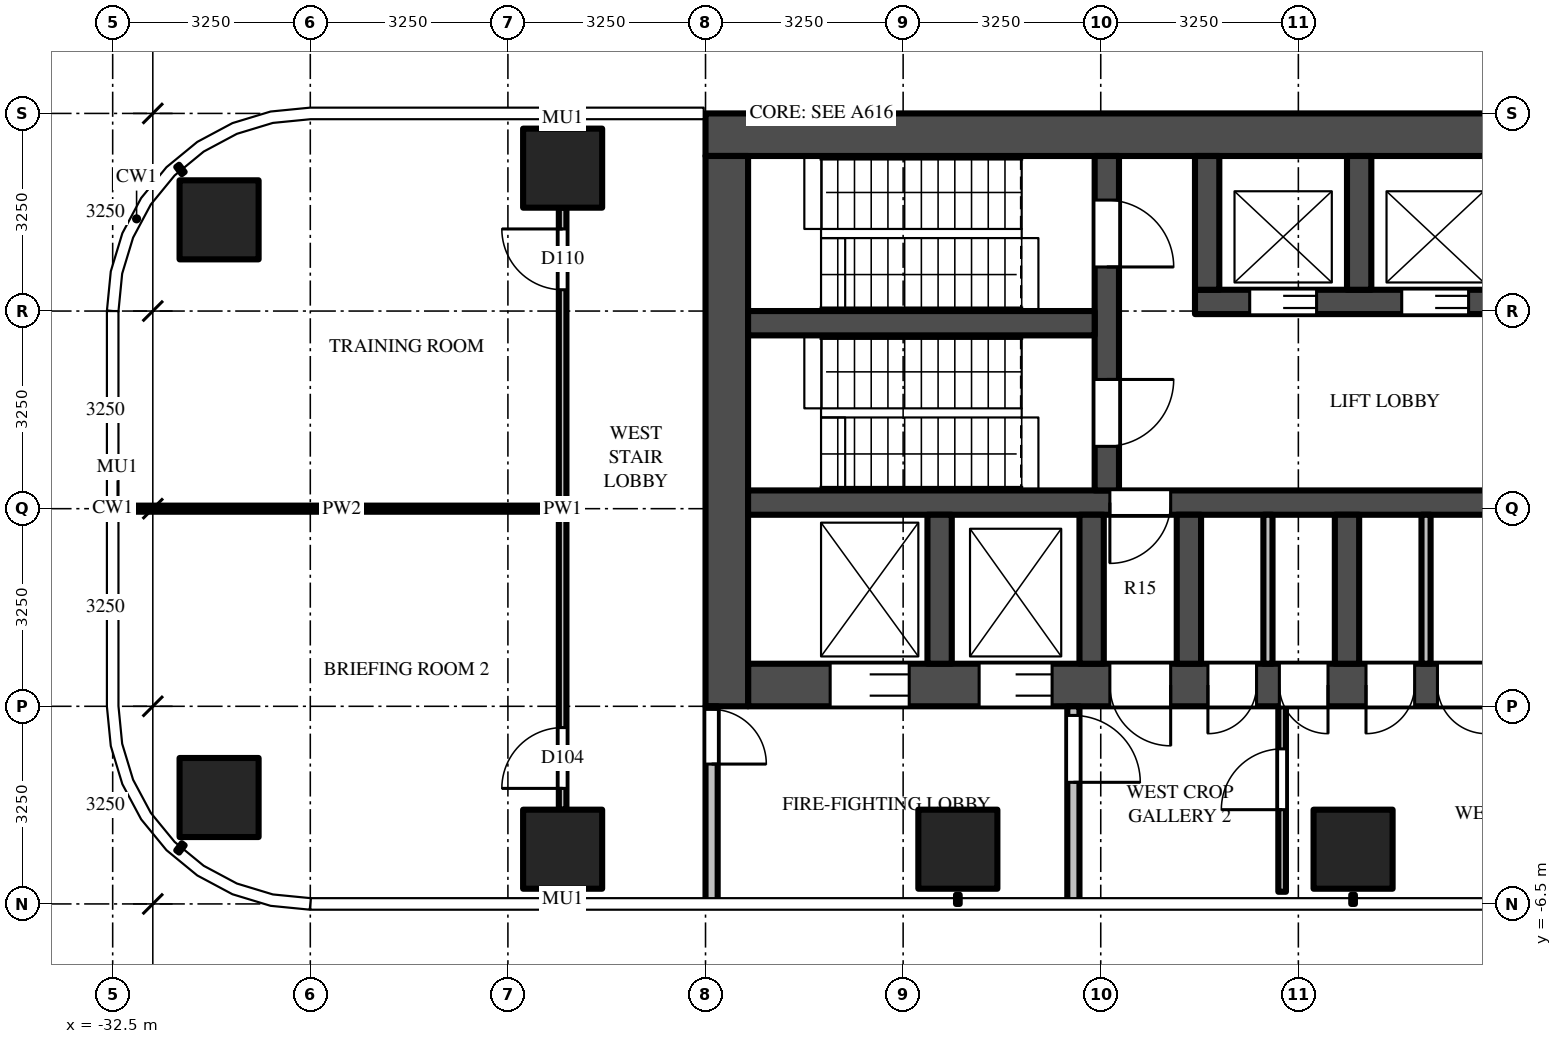
"""IFC4 building model, lengths in metres.
Left out: names, types, materials, properties, quantities, classifications, styles, units other than length and angle.
Written with IfcOpenShell. Run it as: python <this file> out.ifc"""

import sys

from ifc_helpers import new_model, si_unit, direction, frame, frame_2d, origin, origin_2d, place, context, subcontext, project, spatial, rectangle, extrude, source, transform, mapped, element, fill, save


model = new_model("IFC4")
c1 = context("Model", 3, precision=1e-05, world=origin(), true_north=direction((0.0, 1.0)))
c2 = subcontext(c1, "Body", "Model", "MODEL_VIEW")
j1 = project(units=[si_unit("LENGTHUNIT", "METRE"), si_unit("PLANEANGLEUNIT", "RADIAN")], contexts=[c1])
p1 = place(None, origin())
s1 = spatial("IfcSite", under=j1, at=p1, CompositionType="ELEMENT")
p2 = place(p1, origin())
s2 = spatial("IfcBuilding", under=s1, at=p2, CompositionType="ELEMENT")
p3 = place(p2, frame((0.0, 0.0, 138.0)))
s3 = spatial("IfcBuildingStorey", under=s2, at=p3, CompositionType="ELEMENT", Elevation=138.0)
m1 = source(origin(), c2, "Body", "SweptSolid", [
    extrude(rectangle(XDim=1.3, YDim=1.3, at=origin_2d()), origin(), (0.0, 0.0, 1.0), 4.5),
])
for number, where, z_axis, x_axis in (
    (1, (-12.1, -5.6, 0.0), (0.0, 0.0, 1.0), (1.0, 0.0, 0.0)),
    (2, (-18.6, -5.6, 0.0), (0.0, 0.0, 1.0), (1.0, 0.0, 0.0)),
    (3, (-25.1, -5.6, 0.0), (0.0, 0.0, 1.0), (1.0, 0.0, 0.0)),
    (4, (-30.75, -4.75, 0.0), (0.0, 0.0, 1.0), (1.0, 0.0, 0.0)),
    (5, (-25.1, 5.6, 0.0), (0.0, 0.0, 1.0), (1.0, 0.0, 0.0)),
    (6, (-30.75, 4.75, 0.0), (0.0, 0.0, 1.0), (1.0, 0.0, 0.0)),
):
    element("IfcColumn", number, at=place(p3, frame(where, z_axis=z_axis, x_axis=x_axis)), inside=s3, PredefinedType="COLUMN", context=c2, shape_type="MappedRepresentation", body=[
        mapped(m1, transform((0.0, 0.0, 0.0))),
    ])
m2 = source(origin(), c2, "Body", "SweptSolid", [
    extrude(rectangle(XDim=16.5, YDim=0.7, at=frame_2d((8.25, 0.0))), origin(), (0.0, 0.0, 1.0), 4.25),
])
p4 = place(p3, frame((-6.25, 6.15, 0.0), z_axis=(0.0, 0.0, 1.0), x_axis=(-1.0, 0.0, 0.0)))
e7 = element("IfcWall", 7, at=p4, inside=s3, PredefinedType="SHEAR", context=c2, shape_type="MappedRepresentation", body=[
    mapped(m2, transform((0.0, 0.0, 0.0))),
])
m3 = source(origin(), c2, "Body", "SweptSolid", [
    extrude(rectangle(XDim=14.85, YDim=0.7, at=frame_2d((7.425, 0.0))), origin(), (0.0, 0.0, 1.0), 4.25),
])
p5 = place(p3, frame((-7.2, -2.9, 0.0), z_axis=(0.0, 0.0, 1.0), x_axis=(-1.0, 0.0, 0.0)))
e8 = element("IfcWall", 8, at=p5, inside=s3, PredefinedType="SHEAR", context=c2, shape_type="MappedRepresentation", body=[
    mapped(m3, transform((0.0, 0.0, 0.0))),
])
m4 = source(origin(), c2, "Body", "SweptSolid", [
    extrude(rectangle(XDim=1.3, YDim=2.1, at=frame_2d((0.65, 1.05))), frame((0.0, 0.36, 0.0), z_axis=(0.0, -1.0, 0.0), x_axis=(1.0, 0.0, 0.0)), (0.0, 0.0, 1.0), 0.72),
])
p6 = place(p5, frame((12.2, 0.0, 0.0)))
e9 = element("IfcOpeningElement", 9, at=p6, cuts=e8, PredefinedType="OPENING", context=c2, shape_type="MappedRepresentation", body=[
    mapped(m4, transform((0.0, 0.0, 0.0))),
])
m5 = source(origin(), c2, "Body", "SweptSolid", [
    extrude(rectangle(XDim=1.2, YDim=2.1, at=frame_2d((0.6, 1.05))), frame((0.0, 0.36, 0.0), z_axis=(0.0, -1.0, 0.0), x_axis=(1.0, 0.0, 0.0)), (0.0, 0.0, 1.0), 0.72),
])
p7 = place(p5, frame((9.85, 0.0, 0.0)))
e10 = element("IfcOpeningElement", 10, at=p7, cuts=e8, PredefinedType="OPENING", context=c2, shape_type="MappedRepresentation", body=[
    mapped(m5, transform((0.0, 0.0, 0.0))),
])
m6 = source(origin(), c2, "Body", "SweptSolid", [
    extrude(rectangle(XDim=1.0, YDim=2.1, at=frame_2d((0.5, 1.05))), frame((0.0, 0.36, 0.0), z_axis=(0.0, -1.0, 0.0), x_axis=(1.0, 0.0, 0.0)), (0.0, 0.0, 1.0), 0.72),
])
p8 = place(p5, frame((7.9, 0.0, 0.0)))
e11 = element("IfcOpeningElement", 11, at=p8, cuts=e8, PredefinedType="OPENING", context=c2, shape_type="MappedRepresentation", body=[
    mapped(m6, transform((0.0, 0.0, 0.0))),
])
m7 = source(origin(), c2, "Body", "SweptSolid", [
    extrude(rectangle(XDim=0.8, YDim=2.1, at=frame_2d((0.4, 1.05))), frame((0.0, 0.36, 0.0), z_axis=(0.0, -1.0, 0.0), x_axis=(1.0, 0.0, 0.0)), (0.0, 0.0, 1.0), 0.72),
])
p9 = place(p5, frame((0.113, 0.0, 0.0)))
e12 = element("IfcOpeningElement", 12, at=p9, cuts=e8, PredefinedType="OPENING", context=c2, shape_type="MappedRepresentation", body=[
    mapped(m7, transform((0.0, 0.0, 0.0))),
])
p10 = place(p5, frame((1.288, 0.0, 0.0)))
e13 = element("IfcOpeningElement", 13, at=p10, cuts=e8, PredefinedType="OPENING", context=c2, shape_type="MappedRepresentation", body=[
    mapped(m7, transform((0.0, 0.0, 0.0))),
])
p11 = place(p5, frame((2.712, 0.0, 0.0)))
e14 = element("IfcOpeningElement", 14, at=p11, cuts=e8, PredefinedType="OPENING", context=c2, shape_type="MappedRepresentation", body=[
    mapped(m7, transform((0.0, 0.0, 0.0))),
])
p12 = place(p5, frame((3.887, 0.0, 0.0)))
e15 = element("IfcOpeningElement", 15, at=p12, cuts=e8, PredefinedType="OPENING", context=c2, shape_type="MappedRepresentation", body=[
    mapped(m7, transform((0.0, 0.0, 0.0))),
])
p13 = place(p5, frame((5.312, 0.0, 0.0)))
e16 = element("IfcOpeningElement", 16, at=p13, cuts=e8, PredefinedType="OPENING", context=c2, shape_type="MappedRepresentation", body=[
    mapped(m7, transform((0.0, 0.0, 0.0))),
])
p14 = place(p5, frame((6.488, 0.0, 0.0)))
e17 = element("IfcOpeningElement", 17, at=p14, cuts=e8, PredefinedType="OPENING", context=c2, shape_type="MappedRepresentation", body=[
    mapped(m7, transform((0.0, 0.0, 0.0))),
])
m8 = source(origin(), c2, "Body", "SweptSolid", [
    extrude(rectangle(XDim=9.05, YDim=0.7, at=frame_2d((4.525, 0.0))), origin(), (0.0, 0.0, 1.0), 4.25),
])
p15 = place(p3, frame((-22.4, 5.8, 0.0), z_axis=(0.0, 0.0, 1.0), x_axis=(0.0, -1.0, 0.0)))
e18 = element("IfcWall", 18, at=p15, inside=s3, PredefinedType="SHEAR", context=c2, shape_type="MappedRepresentation", body=[
    mapped(m8, transform((0.0, 0.0, 0.0))),
])
m9 = source(origin(), c2, "Body", "SweptSolid", [
    extrude(rectangle(XDim=7.5, YDim=0.4, at=frame_2d((3.75, 0.0))), origin(), (0.0, 0.0, 1.0), 4.25),
])
p16 = place(p3, frame((-7.2, 3.4, 0.0), z_axis=(0.0, 0.0, 1.0), x_axis=(-1.0, 0.0, 0.0)))
e19 = element("IfcWall", 19, at=p16, inside=s3, PredefinedType="SHEAR", context=c2, shape_type="MappedRepresentation", body=[
    mapped(m9, transform((0.0, 0.0, 0.0))),
])
m10 = source(origin(), c2, "Body", "SweptSolid", [
    extrude(rectangle(XDim=1.1, YDim=2.1, at=frame_2d((0.55, 1.05))), frame((0.0, 0.21, 0.0), z_axis=(0.0, -1.0, 0.0), x_axis=(1.0, 0.0, 0.0)), (0.0, 0.0, 1.0), 0.42),
])
p17 = place(p16, frame((3.0, 0.0, 0.0)))
e20 = element("IfcOpeningElement", 20, at=p17, cuts=e19, PredefinedType="OPENING", context=c2, shape_type="MappedRepresentation", body=[
    mapped(m10, transform((0.0, 0.0, 0.0))),
])
p18 = place(p16, frame((5.5, 0.0, 0.0)))
e21 = element("IfcOpeningElement", 21, at=p18, cuts=e19, PredefinedType="OPENING", context=c2, shape_type="MappedRepresentation", body=[
    mapped(m10, transform((0.0, 0.0, 0.0))),
])
m11 = source(origin(), c2, "Body", "SweptSolid", [
    extrude(rectangle(XDim=14.85, YDim=0.4, at=frame_2d((7.425, 0.0))), origin(), (0.0, 0.0, 1.0), 4.25),
])
p19 = place(p3, frame((-7.2, 0.1, 0.0), z_axis=(0.0, 0.0, 1.0), x_axis=(-1.0, 0.0, 0.0)))
e22 = element("IfcWall", 22, at=p19, inside=s3, PredefinedType="SHEAR", context=c2, shape_type="MappedRepresentation", body=[
    mapped(m11, transform((0.0, 0.0, 0.0))),
])
m12 = source(origin(), c2, "Body", "SweptSolid", [
    extrude(rectangle(XDim=1.0, YDim=2.1, at=frame_2d((0.5, 1.05))), frame((0.0, 0.21, 0.0), z_axis=(0.0, -1.0, 0.0), x_axis=(1.0, 0.0, 0.0)), (0.0, 0.0, 1.0), 0.42),
])
p20 = place(p19, frame((7.9, 0.0, 0.0)))
e23 = element("IfcOpeningElement", 23, at=p20, cuts=e22, PredefinedType="OPENING", context=c2, shape_type="MappedRepresentation", body=[
    mapped(m12, transform((0.0, 0.0, 0.0))),
])
m13 = source(origin(), c2, "Body", "SweptSolid", [
    extrude(rectangle(XDim=5.5, YDim=0.4, at=frame_2d((2.75, 0.0))), origin(), (0.0, 0.0, 1.0), 4.25),
])
p21 = place(p3, frame((-16.15, 5.8, 0.0), z_axis=(0.0, 0.0, 1.0), x_axis=(0.0, -1.0, 0.0)))
e24 = element("IfcWall", 24, at=p21, inside=s3, PredefinedType="SHEAR", context=c2, shape_type="MappedRepresentation", body=[
    mapped(m13, transform((0.0, 0.0, 0.0))),
])
p22 = place(p21, frame((0.725, 0.0, 0.0)))
e25 = element("IfcOpeningElement", 25, at=p22, cuts=e24, PredefinedType="OPENING", context=c2, shape_type="MappedRepresentation", body=[
    mapped(m10, transform((0.0, 0.0, 0.0))),
])
p23 = place(p21, frame((3.675, 0.0, 0.0)))
e26 = element("IfcOpeningElement", 26, at=p23, cuts=e24, PredefinedType="OPENING", context=c2, shape_type="MappedRepresentation", body=[
    mapped(m10, transform((0.0, 0.0, 0.0))),
])
m14 = source(origin(), c2, "Body", "SweptSolid", [
    extrude(rectangle(XDim=5.7, YDim=0.4, at=frame_2d((2.85, 0.0))), origin(), (0.0, 0.0, 1.0), 4.25),
])
p24 = place(p3, frame((-16.35, 3.05, 0.0), z_axis=(0.0, 0.0, 1.0), x_axis=(-1.0, 0.0, 0.0)))
e27 = element("IfcWall", 27, at=p24, inside=s3, PredefinedType="SHEAR", context=c2, shape_type="MappedRepresentation", body=[
    mapped(m14, transform((0.0, 0.0, 0.0))),
])
m15 = source(origin(), c2, "Body", "SweptSolid", [
    extrude(rectangle(XDim=2.2, YDim=0.4, at=frame_2d((1.1, 0.0))), origin(), (0.0, 0.0, 1.0), 4.25),
])
for number, where, z_axis, x_axis in (
    (28, (-12.0, 5.8, 0.0), (0.0, 0.0, 1.0), (0.0, -1.0, 0.0)),
    (29, (-14.5, 5.8, 0.0), (0.0, 0.0, 1.0), (0.0, -1.0, 0.0)),
):
    element("IfcWall", number, at=place(p3, frame(where, z_axis=z_axis, x_axis=x_axis)), inside=s3, PredefinedType="SHEAR", context=c2, shape_type="MappedRepresentation", body=[
        mapped(m15, transform((0.0, 0.0, 0.0))),
    ])
m16 = source(origin(), c2, "Body", "SweptSolid", [
    extrude(rectangle(XDim=2.45, YDim=0.4, at=frame_2d((1.225, 0.0))), origin(), (0.0, 0.0, 1.0), 4.25),
])
for number, where, z_axis, x_axis in (
    (30, (-12.2, -0.1, 0.0), (0.0, 0.0, 1.0), (0.0, -1.0, 0.0)),
    (31, (-14.8, -0.1, 0.0), (0.0, 0.0, 1.0), (0.0, -1.0, 0.0)),
    (32, (-16.4, -0.1, 0.0), (0.0, 0.0, 1.0), (0.0, -1.0, 0.0)),
    (33, (-18.9, -0.1, 0.0), (0.0, 0.0, 1.0), (0.0, -1.0, 0.0)),
):
    element("IfcWall", number, at=place(p3, frame(where, z_axis=z_axis, x_axis=x_axis)), inside=s3, PredefinedType="SHEAR", context=c2, shape_type="MappedRepresentation", body=[
        mapped(m16, transform((0.0, 0.0, 0.0))),
    ])
m17 = source(origin(), c2, "Body", "SweptSolid", [
    extrude(rectangle(XDim=3.25, YDim=0.2, at=frame_2d((1.625, 0.0))), origin(), (0.0, 0.0, 1.0), 4.25),
])
p25 = place(p3, frame((-16.7, -3.25, 0.0), z_axis=(0.0, 0.0, 1.0), x_axis=(0.0, -1.0, 0.0)))
e34 = element("IfcWall", 34, at=p25, inside=s3, PredefinedType="PARTITIONING", context=c2, shape_type="MappedRepresentation", body=[
    mapped(m17, transform((0.0, 0.0, 0.0))),
])
m18 = source(origin(), c2, "Body", "SweptSolid", [
    extrude(rectangle(XDim=1.1, YDim=2.1, at=frame_2d((0.55, 1.05))), frame((0.0, 0.11, 0.0), z_axis=(0.0, -1.0, 0.0), x_axis=(1.0, 0.0, 0.0)), (0.0, 0.0, 1.0), 0.22),
])
p26 = place(p25, frame((0.15, 0.0, 0.0)))
e35 = element("IfcOpeningElement", 35, at=p26, cuts=e34, PredefinedType="OPENING", context=c2, shape_type="MappedRepresentation", body=[
    mapped(m18, transform((0.0, 0.0, 0.0))),
])
p27 = place(p3, frame((-22.65, -3.25, 0.0), z_axis=(0.0, 0.0, 1.0), x_axis=(0.0, -1.0, 0.0)))
e36 = element("IfcWall", 36, at=p27, inside=s3, PredefinedType="PARTITIONING", context=c2, shape_type="MappedRepresentation", body=[
    mapped(m17, transform((0.0, 0.0, 0.0))),
])
m19 = source(origin(), c2, "Body", "SweptSolid", [
    extrude(rectangle(XDim=0.9, YDim=2.1, at=frame_2d((0.45, 1.05))), frame((0.0, 0.11, 0.0), z_axis=(0.0, -1.0, 0.0), x_axis=(1.0, 0.0, 0.0)), (0.0, 0.0, 1.0), 0.22),
])
p28 = place(p27, frame((0.05, 0.0, 0.0)))
e37 = element("IfcOpeningElement", 37, at=p28, cuts=e36, PredefinedType="OPENING", context=c2, shape_type="MappedRepresentation", body=[
    mapped(m19, transform((0.0, 0.0, 0.0))),
])
m20 = source(origin(), c2, "Body", "SweptSolid", [
    extrude(rectangle(XDim=2.45, YDim=0.15, at=frame_2d((1.225, 0.0))), origin(), (0.0, 0.0, 1.0), 4.25),
])
for number, where, z_axis, x_axis in (
    (38, (-10.9, -0.1, 0.0), (0.0, 0.0, 1.0), (0.0, -1.0, 0.0)),
    (39, (-13.5, -0.1, 0.0), (0.0, 0.0, 1.0), (0.0, -1.0, 0.0)),
):
    element("IfcWall", number, at=place(p3, frame(where, z_axis=z_axis, x_axis=x_axis)), inside=s3, PredefinedType="PARTITIONING", context=c2, shape_type="MappedRepresentation", body=[
        mapped(m20, transform((0.0, 0.0, 0.0))),
    ])
m21 = source(origin(), c2, "Body", "SweptSolid", [
    extrude(rectangle(XDim=9.9, YDim=0.125, at=frame_2d((4.95, 0.0))), origin(), (0.0, 0.0, 1.0), 3.468),
])
p29 = place(p3, frame((-25.1, -4.95, 0.0), z_axis=(0.0, 0.0, 1.0), x_axis=(0.0, 1.0, 0.0)))
e40 = element("IfcWall", 40, at=p29, inside=s3, PredefinedType="PARTITIONING", context=c2, shape_type="MappedRepresentation", body=[
    mapped(m21, transform((0.0, 0.0, 0.0))),
])
m22 = source(origin(), c2, "Body", "SweptSolid", [
    extrude(rectangle(XDim=1.0, YDim=2.1, at=frame_2d((0.5, 1.05))), frame((0.0, 0.073, 0.0), z_axis=(0.0, -1.0, 0.0), x_axis=(1.0, 0.0, 0.0)), (0.0, 0.0, 1.0), 0.145),
])
p30 = place(p29, frame((0.35, 0.0, 0.0)))
e41 = element("IfcOpeningElement", 41, at=p30, cuts=e40, PredefinedType="OPENING", context=c2, shape_type="MappedRepresentation", body=[
    mapped(m22, transform((0.0, 0.0, 0.0))),
])
p31 = place(p29, frame((8.55, 0.0, 0.0)))
e42 = element("IfcOpeningElement", 42, at=p31, cuts=e40, PredefinedType="OPENING", context=c2, shape_type="MappedRepresentation", body=[
    mapped(m22, transform((0.0, 0.0, 0.0))),
])
m23 = source(origin(), c2, "Body", "SweptSolid", [
    extrude(rectangle(XDim=3.05, YDim=0.125, at=frame_2d((1.525, 0.0))), origin(), (0.0, 0.0, 1.0), 3.33),
])
p32 = place(p3, frame((-13.267, -6.3, 0.0), z_axis=(0.0, 0.0, 1.0), x_axis=(0.0, 1.0, 0.0)))
e43 = element("IfcWall", 43, at=p32, inside=s3, PredefinedType="PARTITIONING", context=c2, shape_type="MappedRepresentation", body=[
    mapped(m23, transform((0.0, 0.0, 0.0))),
])
p33 = place(p32, frame((1.35, 0.0, 0.0)))
e44 = element("IfcOpeningElement", 44, at=p33, cuts=e43, PredefinedType="OPENING", context=c2, shape_type="MappedRepresentation", body=[
    mapped(m22, transform((0.0, 0.0, 0.0))),
])
m24 = source(origin(), c2, "Body", "SweptSolid", [
    extrude(rectangle(XDim=7.137, YDim=0.1, at=frame_2d((3.569, 0.0))), origin(), (0.0, 0.0, 1.0), 3.33),
])
p34 = place(p3, frame((-32.3, 0.0, 0.0), z_axis=(0.0, 0.0, 1.0), x_axis=(1.0, 0.0, 0.0)))
e45 = element("IfcWall", 45, at=p34, inside=s3, PredefinedType="PARTITIONING", context=c2, shape_type="MappedRepresentation", body=[
    mapped(m24, transform((0.0, 0.0, 0.0))),
])
m25 = source(origin(), c2, "Body", "SweptSolid", [
    extrude(rectangle(XDim=1.1, YDim=2.1, at=frame_2d((0.55, 1.05))), frame((0.0, 0.025, 0.0), z_axis=(0.0, -1.0, 0.0), x_axis=(1.0, 0.0, 0.0)), (0.0, 0.0, 1.0), 0.05),
])
p35 = place(p17, origin())
e46 = element("IfcDoor", 46, at=p35, inside=s3, OperationType="DOUBLE_DOOR_SLIDING", PredefinedType="DOOR", context=c2, shape_type="MappedRepresentation", body=[
    mapped(m25, transform((0.0, 0.0, 0.0))),
])
fill(e20, e46)
p36 = place(p18, origin())
e47 = element("IfcDoor", 47, at=p36, inside=s3, OperationType="DOUBLE_DOOR_SLIDING", PredefinedType="DOOR", context=c2, shape_type="MappedRepresentation", body=[
    mapped(m25, transform((0.0, 0.0, 0.0))),
])
fill(e21, e47)
m26 = source(origin(), c2, "Body", "SweptSolid", [
    extrude(rectangle(XDim=1.3, YDim=2.1, at=frame_2d((0.65, 1.05))), frame((0.0, -0.275, 0.0), z_axis=(0.0, -1.0, 0.0), x_axis=(1.0, 0.0, 0.0)), (0.0, 0.0, 1.0), 0.05),
])
p37 = place(p6, origin())
e48 = element("IfcDoor", 48, at=p37, inside=s3, OperationType="DOUBLE_DOOR_SLIDING", PredefinedType="DOOR", context=c2, shape_type="MappedRepresentation", body=[
    mapped(m26, transform((0.0, 0.0, 0.0))),
])
fill(e9, e48)
m27 = source(origin(), c2, "Body", "SweptSolid", [
    extrude(rectangle(XDim=1.2, YDim=2.1, at=frame_2d((0.6, 1.05))), frame((0.0, -0.275, 0.0), z_axis=(0.0, -1.0, 0.0), x_axis=(1.0, 0.0, 0.0)), (0.0, 0.0, 1.0), 0.05),
])
p38 = place(p7, origin())
e49 = element("IfcDoor", 49, at=p38, inside=s3, OperationType="DOUBLE_DOOR_SLIDING", PredefinedType="DOOR", context=c2, shape_type="MappedRepresentation", body=[
    mapped(m27, transform((0.0, 0.0, 0.0))),
])
fill(e10, e49)
p39 = place(p22, origin())
e50 = element("IfcDoor", 50, at=p39, inside=s3, OperationType="SINGLE_SWING_RIGHT", PredefinedType="DOOR", context=c2, shape_type="MappedRepresentation", body=[
    mapped(m25, transform((0.0, 0.0, 0.0))),
])
fill(e25, e50)
p40 = place(p23, origin())
e51 = element("IfcDoor", 51, at=p40, inside=s3, OperationType="SINGLE_SWING_LEFT", PredefinedType="DOOR", context=c2, shape_type="MappedRepresentation", body=[
    mapped(m25, transform((0.0, 0.0, 0.0))),
])
fill(e26, e51)
m28 = source(origin(), c2, "Body", "SweptSolid", [
    extrude(rectangle(XDim=1.0, YDim=2.1, at=frame_2d((0.5, 1.05))), frame((0.0, 0.025, 0.0), z_axis=(0.0, -1.0, 0.0), x_axis=(1.0, 0.0, 0.0)), (0.0, 0.0, 1.0), 0.05),
])
p41 = place(p20, origin())
e52 = element("IfcDoor", 52, at=p41, inside=s3, OperationType="SINGLE_SWING_RIGHT", PredefinedType="DOOR", context=c2, shape_type="MappedRepresentation", body=[
    mapped(m28, transform((0.0, 0.0, 0.0))),
])
fill(e23, e52)
m29 = source(origin(), c2, "Body", "SweptSolid", [
    extrude(rectangle(XDim=1.0, YDim=2.1, at=frame_2d((0.5, 1.05))), frame((0.0, -0.275, 0.0), z_axis=(0.0, -1.0, 0.0), x_axis=(1.0, 0.0, 0.0)), (0.0, 0.0, 1.0), 0.05),
])
p42 = place(p8, origin())
e53 = element("IfcDoor", 53, at=p42, inside=s3, OperationType="SINGLE_SWING_LEFT", PredefinedType="DOOR", context=c2, shape_type="MappedRepresentation", body=[
    mapped(m29, transform((0.0, 0.0, 0.0))),
])
fill(e11, e53)
p43 = place(p26, origin())
e54 = element("IfcDoor", 54, at=p43, inside=s3, OperationType="SINGLE_SWING_RIGHT", PredefinedType="DOOR", context=c2, shape_type="MappedRepresentation", body=[
    mapped(m25, transform((0.0, 0.0, 0.0))),
])
fill(e35, e54)
m30 = source(origin(), c2, "Body", "SweptSolid", [
    extrude(rectangle(XDim=0.9, YDim=2.1, at=frame_2d((0.45, 1.05))), frame((0.0, 0.025, 0.0), z_axis=(0.0, -1.0, 0.0), x_axis=(1.0, 0.0, 0.0)), (0.0, 0.0, 1.0), 0.05),
])
p44 = place(p28, origin())
e55 = element("IfcDoor", 55, at=p44, inside=s3, OperationType="SINGLE_SWING_RIGHT", PredefinedType="DOOR", context=c2, shape_type="MappedRepresentation", body=[
    mapped(m30, transform((0.0, 0.0, 0.0))),
])
fill(e37, e55)
m31 = source(origin(), c2, "Body", "SweptSolid", [
    extrude(rectangle(XDim=0.8, YDim=2.1, at=frame_2d((0.4, 1.05))), frame((0.0, -0.275, 0.0), z_axis=(0.0, -1.0, 0.0), x_axis=(1.0, 0.0, 0.0)), (0.0, 0.0, 1.0), 0.05),
])
p45 = place(p11, origin())
e56 = element("IfcDoor", 56, at=p45, inside=s3, OperationType="SINGLE_SWING_LEFT", PredefinedType="DOOR", context=c2, shape_type="MappedRepresentation", body=[
    mapped(m31, transform((0.0, 0.0, 0.0))),
])
fill(e14, e56)
p46 = place(p12, origin())
e57 = element("IfcDoor", 57, at=p46, inside=s3, OperationType="SINGLE_SWING_RIGHT", PredefinedType="DOOR", context=c2, shape_type="MappedRepresentation", body=[
    mapped(m31, transform((0.0, 0.0, 0.0))),
])
fill(e15, e57)
p47 = place(p13, origin())
e58 = element("IfcDoor", 58, at=p47, inside=s3, OperationType="SINGLE_SWING_LEFT", PredefinedType="DOOR", context=c2, shape_type="MappedRepresentation", body=[
    mapped(m31, transform((0.0, 0.0, 0.0))),
])
fill(e16, e58)
p48 = place(p14, origin())
e59 = element("IfcDoor", 59, at=p48, inside=s3, OperationType="SINGLE_SWING_RIGHT", PredefinedType="DOOR", context=c2, shape_type="MappedRepresentation", body=[
    mapped(m31, transform((0.0, 0.0, 0.0))),
])
fill(e17, e59)
p49 = place(p33, origin())
e60 = element("IfcDoor", 60, at=p49, inside=s3, OperationType="SINGLE_SWING_LEFT", PredefinedType="DOOR", context=c2, shape_type="MappedRepresentation", body=[
    mapped(m28, transform((0.0, 0.0, 0.0))),
])
fill(e44, e60)
p50 = place(p30, origin())
e61 = element("IfcDoor", 61, at=p50, inside=s3, OperationType="SINGLE_SWING_LEFT", PredefinedType="DOOR", context=c2, shape_type="MappedRepresentation", body=[
    mapped(m28, transform((0.0, 0.0, 0.0))),
])
fill(e41, e61)
p51 = place(p31, origin())
e62 = element("IfcDoor", 62, at=p51, inside=s3, OperationType="SINGLE_SWING_RIGHT", PredefinedType="DOOR", context=c2, shape_type="MappedRepresentation", body=[
    mapped(m28, transform((0.0, 0.0, 0.0))),
])
fill(e42, e62)
save(model, sys.argv[1])
